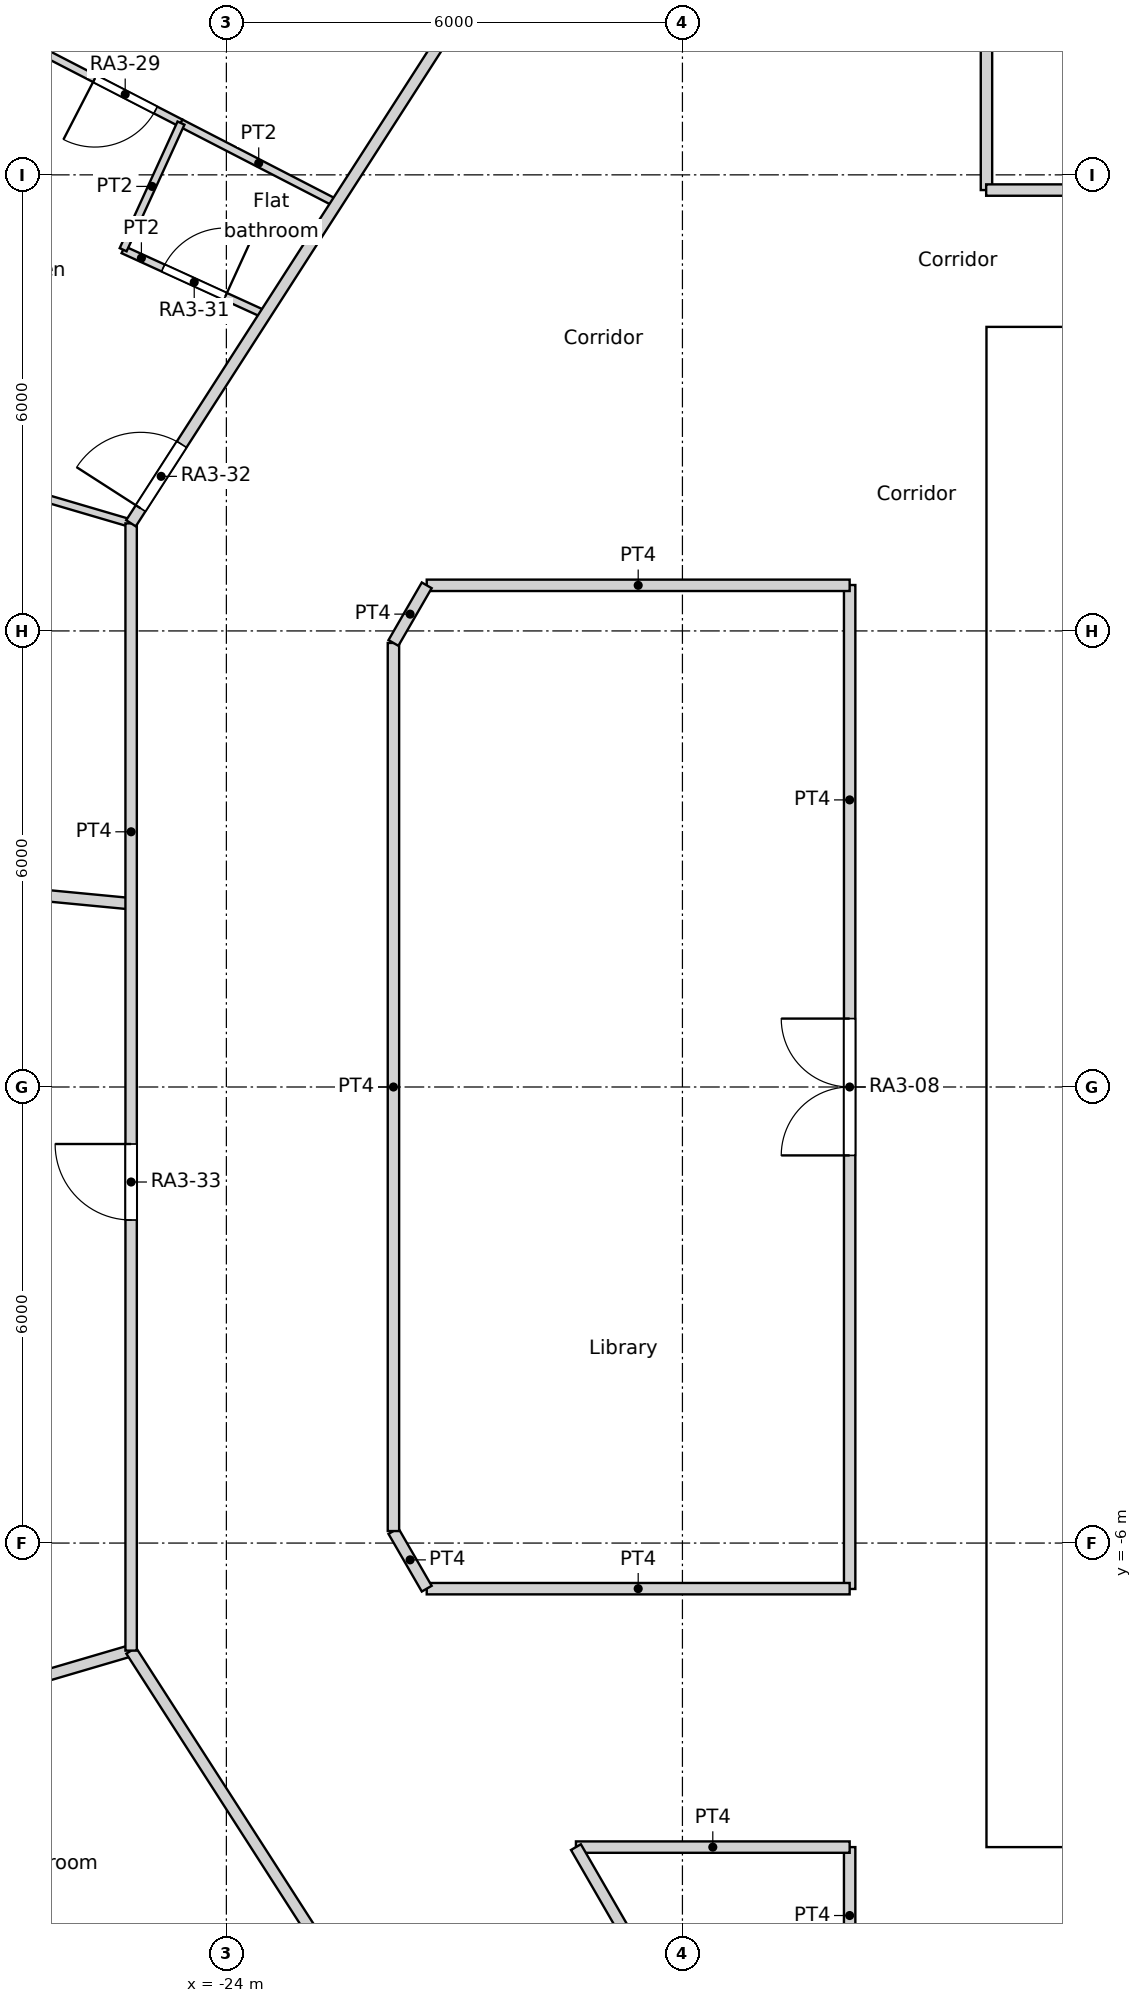
"""IFC4 building model, lengths in metres.
Left out: names, types, materials, properties, quantities, classifications, styles, units other than length and angle.
Written with IfcOpenShell. Run it as: python <this file> out.ifc"""

import sys

from ifc_helpers import new_model, si_unit, direction, frame, frame_2d, origin, origin_2d, place, context, subcontext, project, spatial, rectangle, circle, extrude, element, fill, save


model = new_model("IFC4")
c1 = context("Model", 3, precision=1e-05, world=origin(), true_north=direction((0.0, 1.0)))
c2 = subcontext(c1, "Body", "Model", "MODEL_VIEW")
j1 = project(units=[si_unit("LENGTHUNIT", "METRE"), si_unit("PLANEANGLEUNIT", "RADIAN")], contexts=[c1])
p1 = place(None, origin())
s1 = spatial("IfcSite", under=j1, at=p1, CompositionType="ELEMENT")
p2 = place(p1, origin())
s2 = spatial("IfcBuilding", under=s1, at=p2, CompositionType="ELEMENT")
p3 = place(p2, frame((0.0, 0.0, 49.8)))
s3 = spatial("IfcBuildingStorey", under=s2, at=p3, CompositionType="ELEMENT", Elevation=49.8)
p4 = place(p3, frame((-26.909, 13.873, 0.0), z_axis=(0.0, 0.0, 1.0), x_axis=(1.0, 0.0, 0.0)))
e1 = element("IfcColumn", 1, at=p4, inside=s3, PredefinedType="COLUMN", context=c2, shape_type="SweptSolid", body=[
    extrude(circle(Radius=0.7, at=origin_2d()), origin(), (0.0, 0.0, 1.0), 3.6),
])
for number, where, z_axis, x_axis in (
    (2, (-20.509, 13.489, 0.0), (0.0, 0.0, 1.0), (1.0, 0.0, 0.0)),
    (3, (-23.067, 8.396, 0.0), (0.0, 0.0, 1.0), (1.0, 0.0, 0.0)),
    (4, (-24.382, 2.85, 0.0), (0.0, 0.0, 1.0), (1.0, 0.0, 0.0)),
    (5, (-24.382, -2.85, 0.0), (0.0, 0.0, 1.0), (1.0, 0.0, 0.0)),
    (6, (-23.067, -8.396, 0.0), (0.0, 0.0, 1.0), (1.0, 0.0, 0.0)),
):
    element("IfcColumn", number, at=place(p3, frame(where, z_axis=z_axis, x_axis=x_axis)), inside=s3, PredefinedType="COLUMN", context=c2, shape_type="SweptSolid", body=[
        extrude(circle(Radius=0.75, at=origin_2d()), origin(), (0.0, 0.0, 1.0), 3.6),
    ])
for number, where, z_axis, x_axis in (
    (7, (-13.798, 12.802, 0.0), (0.0, 0.0, 1.0), (1.0, 0.0, 0.0)),
    (8, (-16.958, 8.167, 0.0), (0.0, 0.0, 1.0), (1.0, 0.0, 0.0)),
    (9, (-18.612, 2.805, 0.0), (0.0, 0.0, 1.0), (1.0, 0.0, 0.0)),
    (10, (-18.612, -2.805, 0.0), (0.0, 0.0, 1.0), (1.0, 0.0, 0.0)),
    (11, (-16.958, -8.167, 0.0), (0.0, 0.0, 1.0), (1.0, 0.0, 0.0)),
):
    element("IfcColumn", number, at=place(p3, frame(where, z_axis=z_axis, x_axis=x_axis)), inside=s3, PredefinedType="COLUMN", context=c2, shape_type="SweptSolid", body=[
        extrude(circle(Radius=0.8, at=origin_2d()), origin(), (0.0, 0.0, 1.0), 3.6),
    ])
p5 = place(p3, frame((-14.0, -9.4, 0.0), z_axis=(0.0, 0.0, 1.0), x_axis=(1.0, 0.0, 0.0)))
e12 = element("IfcWall", 12, at=p5, inside=s3, PredefinedType="SOLIDWALL", context=c2, shape_type="SweptSolid", body=[
    extrude(rectangle(XDim=28.0, YDim=1.2, at=frame_2d((14.0, 0.0))), origin(), (0.0, 0.0, 1.0), 3.6),
])
p6 = place(p5, frame((14.9, 0.0, 0.0)))
e13 = element("IfcOpeningElement", 13, at=p6, cuts=e12, PredefinedType="OPENING", context=c2, shape_type="SweptSolid", body=[
    extrude(rectangle(XDim=1.0, YDim=2.1, at=frame_2d((0.5, 1.05))), frame((0.0, 0.6, 0.0), z_axis=(0.0, -1.0, 0.0), x_axis=(1.0, 0.0, 0.0)), (0.0, 0.0, 1.0), 1.2),
])
p7 = place(p5, frame((9.8, 0.0, 0.0)))
e14 = element("IfcOpeningElement", 14, at=p7, cuts=e12, PredefinedType="OPENING", context=c2, shape_type="SweptSolid", body=[
    extrude(rectangle(XDim=1.8, YDim=2.1, at=frame_2d((0.9, 1.05))), frame((0.0, 0.6, 0.0), z_axis=(0.0, -1.0, 0.0), x_axis=(1.0, 0.0, 0.0)), (0.0, 0.0, 1.0), 1.2),
])
p8 = place(p5, frame((16.4, 0.0, 0.0)))
e15 = element("IfcOpeningElement", 15, at=p8, cuts=e12, PredefinedType="OPENING", context=c2, shape_type="SweptSolid", body=[
    extrude(rectangle(XDim=1.8, YDim=2.1, at=frame_2d((0.9, 1.05))), frame((0.0, 0.6, 0.0), z_axis=(0.0, -1.0, 0.0), x_axis=(1.0, 0.0, 0.0)), (0.0, 0.0, 1.0), 1.2),
])
p9 = place(p3, frame((-14.0, 9.4, 0.0), z_axis=(0.0, 0.0, 1.0), x_axis=(1.0, 0.0, 0.0)))
e16 = element("IfcWall", 16, at=p9, inside=s3, PredefinedType="SOLIDWALL", context=c2, shape_type="SweptSolid", body=[
    extrude(rectangle(XDim=28.0, YDim=1.2, at=frame_2d((14.0, 0.0))), origin(), (0.0, 0.0, 1.0), 3.6),
])
p10 = place(p9, frame((9.8, 0.0, 0.0)))
e17 = element("IfcOpeningElement", 17, at=p10, cuts=e16, PredefinedType="OPENING", context=c2, shape_type="SweptSolid", body=[
    extrude(rectangle(XDim=1.8, YDim=2.1, at=frame_2d((0.9, 1.05))), frame((0.0, 0.6, 0.0), z_axis=(0.0, -1.0, 0.0), x_axis=(1.0, 0.0, 0.0)), (0.0, 0.0, 1.0), 1.2),
])
p11 = place(p3, frame((-13.4, -8.8, 0.0), z_axis=(0.0, 0.0, 1.0), x_axis=(0.0, 1.0, 0.0)))
e18 = element("IfcWall", 18, at=p11, inside=s3, PredefinedType="SOLIDWALL", context=c2, shape_type="SweptSolid", body=[
    extrude(rectangle(XDim=17.6, YDim=1.2, at=frame_2d((8.8, 0.0))), origin(), (0.0, 0.0, 1.0), 3.6),
])
p12 = place(p11, frame((5.2, 0.0, 0.0)))
e19 = element("IfcOpeningElement", 19, at=p12, cuts=e18, PredefinedType="OPENING", context=c2, shape_type="SweptSolid", body=[
    extrude(rectangle(XDim=1.0, YDim=2.1, at=frame_2d((0.5, 1.05))), frame((0.0, 0.6, 0.0), z_axis=(0.0, -1.0, 0.0), x_axis=(1.0, 0.0, 0.0)), (0.0, 0.0, 1.0), 1.2),
])
p13 = place(p11, frame((11.4, 0.0, 0.0)))
e20 = element("IfcOpeningElement", 20, at=p13, cuts=e18, PredefinedType="OPENING", context=c2, shape_type="SweptSolid", body=[
    extrude(rectangle(XDim=1.0, YDim=2.1, at=frame_2d((0.5, 1.05))), frame((0.0, 0.6, 0.0), z_axis=(0.0, -1.0, 0.0), x_axis=(1.0, 0.0, 0.0)), (0.0, 0.0, 1.0), 1.2),
])
p14 = place(p3, frame((-14.004, 11.8, 0.0), z_axis=(0.0, 0.0, 1.0), x_axis=(1.0, 0.0, 0.0)))
e21 = element("IfcWall", 21, at=p14, inside=s3, PredefinedType="PARTITIONING", context=c2, shape_type="SweptSolid", body=[
    extrude(rectangle(XDim=12.816, YDim=0.15, at=frame_2d((6.408, 0.0))), origin(), (0.0, 0.0, 1.0), 3.15),
])
p15 = place(p14, frame((5.508, 0.0, 0.0)))
e22 = element("IfcOpeningElement", 22, at=p15, cuts=e21, PredefinedType="OPENING", context=c2, shape_type="SweptSolid", body=[
    extrude(rectangle(XDim=1.8, YDim=2.1, at=frame_2d((0.9, 1.05))), frame((0.0, 0.075, 0.0), z_axis=(0.0, -1.0, 0.0), x_axis=(1.0, 0.0, 0.0)), (0.0, 0.0, 1.0), 0.15),
])
p16 = place(p3, frame((-15.8, -11.8, 0.0), z_axis=(0.0, 0.0, 1.0), x_axis=(0.0, 1.0, 0.0)))
e23 = element("IfcWall", 23, at=p16, inside=s3, PredefinedType="PARTITIONING", context=c2, shape_type="SweptSolid", body=[
    extrude(rectangle(XDim=1.8, YDim=0.15, at=frame_2d((0.9, 0.0))), origin(), (0.0, 0.0, 1.0), 3.15),
])
p17 = place(p3, frame((-15.8, -6.604, 0.0), z_axis=(0.0, 0.0, 1.0), x_axis=(0.0, 1.0, 0.0)))
e24 = element("IfcWall", 24, at=p17, inside=s3, PredefinedType="PARTITIONING", context=c2, shape_type="SweptSolid", body=[
    extrude(rectangle(XDim=13.208, YDim=0.15, at=frame_2d((6.604, 0.0))), origin(), (0.0, 0.0, 1.0), 3.15),
])
p18 = place(p17, frame((5.704, 0.0, 0.0)))
e25 = element("IfcOpeningElement", 25, at=p18, cuts=e24, PredefinedType="OPENING", context=c2, shape_type="SweptSolid", body=[
    extrude(rectangle(XDim=1.8, YDim=2.1, at=frame_2d((0.9, 1.05))), frame((0.0, 0.075, 0.0), z_axis=(0.0, -1.0, 0.0), x_axis=(1.0, 0.0, 0.0)), (0.0, 0.0, 1.0), 0.15),
])
p19 = place(p3, frame((-14.0, 11.8, 0.0), z_axis=(0.0, 0.0, 1.0), x_axis=(0.0, 1.0, 0.0)))
e26 = element("IfcWall", 26, at=p19, inside=s3, PredefinedType="PARTITIONING", context=c2, shape_type="SweptSolid", body=[
    extrude(rectangle(XDim=5.292, YDim=0.15, at=frame_2d((2.646, 0.0))), origin(), (0.0, 0.0, 1.0), 3.15),
])
p20 = place(p3, frame((-25.255, 7.416, 0.0), z_axis=(0.0, 0.0, 1.0), x_axis=(0.540805851332, 0.841147449123, 0.0)))
e27 = element("IfcWall", 27, at=p20, inside=s3, PredefinedType="PARTITIONING", context=c2, shape_type="SweptSolid", body=[
    extrude(rectangle(XDim=14.829, YDim=0.15, at=frame_2d((7.415, 0.0))), origin(), (0.0, 0.0, 1.0), 3.15),
])
p21 = place(p20, frame((0.234, 0.0, 0.0)))
e28 = element("IfcOpeningElement", 28, at=p21, cuts=e27, PredefinedType="OPENING", context=c2, shape_type="SweptSolid", body=[
    extrude(rectangle(XDim=1.0, YDim=2.1, at=frame_2d((0.5, 1.05))), frame((0.0, 0.075, 0.0), z_axis=(0.0, -1.0, 0.0), x_axis=(1.0, 0.0, 0.0)), (0.0, 0.0, 1.0), 0.15),
])
p22 = place(p3, frame((-21.364, 6.6, 0.0), z_axis=(0.0, 0.0, 1.0), x_axis=(1.0, 0.0, 0.0)))
e29 = element("IfcWall", 29, at=p22, inside=s3, PredefinedType="PARTITIONING", context=c2, shape_type="SweptSolid", body=[
    extrude(rectangle(XDim=5.564, YDim=0.15, at=frame_2d((2.782, 0.0))), origin(), (0.0, 0.0, 1.0), 3.15),
])
p23 = place(p3, frame((-21.802, 5.842, 0.0), z_axis=(0.0, 0.0, 1.0), x_axis=(0.500277597875, 0.865865073245, 0.0)))
e30 = element("IfcWall", 30, at=p23, inside=s3, PredefinedType="PARTITIONING", context=c2, shape_type="SweptSolid", body=[
    extrude(rectangle(XDim=0.875, YDim=0.15, at=frame_2d((0.438, 0.0))), origin(), (0.0, 0.0, 1.0), 3.15),
])
p24 = place(p3, frame((-21.802, -5.842, 0.0), z_axis=(0.0, 0.0, 1.0), x_axis=(0.0, 1.0, 0.0)))
e31 = element("IfcWall", 31, at=p24, inside=s3, PredefinedType="PARTITIONING", context=c2, shape_type="SweptSolid", body=[
    extrude(rectangle(XDim=11.684, YDim=0.15, at=frame_2d((5.842, 0.0))), origin(), (0.0, 0.0, 1.0), 3.15),
])
p25 = place(p3, frame((-21.802, -5.842, 0.0), z_axis=(0.0, 0.0, 1.0), x_axis=(0.500277597875, -0.865865073245, 0.0)))
e32 = element("IfcWall", 32, at=p25, inside=s3, PredefinedType="PARTITIONING", context=c2, shape_type="SweptSolid", body=[
    extrude(rectangle(XDim=0.875, YDim=0.15, at=frame_2d((0.438, 0.0))), origin(), (0.0, 0.0, 1.0), 3.15),
])
p26 = place(p3, frame((-21.364, -6.6, 0.0), z_axis=(0.0, 0.0, 1.0), x_axis=(1.0, 0.0, 0.0)))
e33 = element("IfcWall", 33, at=p26, inside=s3, PredefinedType="PARTITIONING", context=c2, shape_type="SweptSolid", body=[
    extrude(rectangle(XDim=5.564, YDim=0.15, at=frame_2d((2.782, 0.0))), origin(), (0.0, 0.0, 1.0), 3.15),
])
p27 = place(p3, frame((-19.401, -10.0, 0.0), z_axis=(0.0, 0.0, 1.0), x_axis=(1.0, 0.0, 0.0)))
e34 = element("IfcWall", 34, at=p27, inside=s3, PredefinedType="PARTITIONING", context=c2, shape_type="SweptSolid", body=[
    extrude(rectangle(XDim=3.601, YDim=0.15, at=frame_2d((1.8, 0.0))), origin(), (0.0, 0.0, 1.0), 3.15),
])
p28 = place(p3, frame((-19.401, -10.0, 0.0), z_axis=(0.0, 0.0, 1.0), x_axis=(0.499992689227, -0.86602962462, 0.0)))
e35 = element("IfcWall", 35, at=p28, inside=s3, PredefinedType="PARTITIONING", context=c2, shape_type="SweptSolid", body=[
    extrude(rectangle(XDim=6.882, YDim=0.15, at=frame_2d((3.441, 0.0))), origin(), (0.0, 0.0, 1.0), 3.15),
])
p29 = place(p28, frame((2.941, 0.0, 0.0)))
e36 = element("IfcOpeningElement", 36, at=p29, cuts=e35, PredefinedType="OPENING", context=c2, shape_type="SweptSolid", body=[
    extrude(rectangle(XDim=1.0, YDim=2.04, at=frame_2d((0.5, 1.02))), frame((0.0, 0.075, 0.0), z_axis=(0.0, -1.0, 0.0), x_axis=(1.0, 0.0, 0.0)), (0.0, 0.0, 1.0), 0.15),
])
p30 = place(p3, frame((-25.253, -7.415, 0.0), z_axis=(0.0, 0.0, 1.0), x_axis=(0.0, 1.0, 0.0)))
e37 = element("IfcWall", 37, at=p30, inside=s3, PredefinedType="PARTITIONING", context=c2, shape_type="SweptSolid", body=[
    extrude(rectangle(XDim=14.83, YDim=0.15, at=frame_2d((7.415, 0.0))), origin(), (0.0, 0.0, 1.0), 3.15),
])
p31 = place(p30, frame((5.665, 0.0, 0.0)))
e38 = element("IfcOpeningElement", 38, at=p31, cuts=e37, PredefinedType="OPENING", context=c2, shape_type="SweptSolid", body=[
    extrude(rectangle(XDim=1.0, YDim=2.04, at=frame_2d((0.5, 1.02))), frame((0.0, 0.075, 0.0), z_axis=(0.0, -1.0, 0.0), x_axis=(1.0, 0.0, 0.0)), (0.0, 0.0, 1.0), 0.15),
])
p32 = place(p3, frame((-25.253, -7.415, 0.0), z_axis=(0.0, 0.0, 1.0), x_axis=(0.540667724156, -0.841236240337, 0.0)))
e39 = element("IfcWall", 39, at=p32, inside=s3, PredefinedType="PARTITIONING", context=c2, shape_type="SweptSolid", body=[
    extrude(rectangle(XDim=14.83, YDim=0.15, at=frame_2d((7.415, 0.0))), origin(), (0.0, 0.0, 1.0), 3.15),
])
p33 = place(p32, frame((5.452, 0.0, 0.0)))
e40 = element("IfcOpeningElement", 40, at=p33, cuts=e39, PredefinedType="OPENING", context=c2, shape_type="SweptSolid", body=[
    extrude(rectangle(XDim=1.0, YDim=2.1, at=frame_2d((0.5, 1.05))), frame((0.0, 0.075, 0.0), z_axis=(0.0, -1.0, 0.0), x_axis=(1.0, 0.0, 0.0)), (0.0, 0.0, 1.0), 0.15),
])
p34 = place(p3, frame((-27.753, 14.308, 0.0), z_axis=(0.0, 0.0, 1.0), x_axis=(0.888816732692, -0.45826282381, 0.0)))
e41 = element("IfcWall", 41, at=p34, inside=s3, PredefinedType="PARTITIONING", context=c2, shape_type="SweptSolid", body=[
    extrude(rectangle(XDim=3.551, YDim=0.1, at=frame_2d((1.775, 0.0))), origin(), (0.0, 0.0, 1.0), 3.15),
])
p35 = place(p34, frame((2.275, 0.0, 0.0)))
e42 = element("IfcOpeningElement", 42, at=p35, cuts=e41, PredefinedType="OPENING", context=c2, shape_type="SweptSolid", body=[
    extrude(rectangle(XDim=0.9, YDim=2.1, at=frame_2d((0.45, 1.05))), frame((0.0, 0.05, 0.0), z_axis=(0.0, -1.0, 0.0), x_axis=(1.0, 0.0, 0.0)), (0.0, 0.0, 1.0), 0.1),
])
p36 = place(p3, frame((-29.959, 8.797, 0.0), z_axis=(0.0, 0.0, 1.0), x_axis=(0.959478767209, -0.281780934902, 0.0)))
e43 = element("IfcWall", 43, at=p36, inside=s3, PredefinedType="PARTITIONING", context=c2, shape_type="SweptSolid", body=[
    extrude(rectangle(XDim=4.905, YDim=0.1, at=frame_2d((2.452, 0.0))), origin(), (0.0, 0.0, 1.0), 3.15),
])
p37 = place(p36, frame((2.303, 0.0, 0.0)))
e44 = element("IfcOpeningElement", 44, at=p37, cuts=e43, PredefinedType="OPENING", context=c2, shape_type="SweptSolid", body=[
    extrude(rectangle(XDim=0.9, YDim=2.1, at=frame_2d((0.45, 1.05))), frame((0.0, 0.05, 0.0), z_axis=(0.0, -1.0, 0.0), x_axis=(1.0, 0.0, 0.0)), (0.0, 0.0, 1.0), 0.1),
])
p38 = place(p3, frame((-25.358, 11.015, 0.0), z_axis=(0.0, 0.0, 1.0), x_axis=(0.415479380762, 0.909602596831, 0.0)))
e45 = element("IfcWall", 45, at=p38, inside=s3, PredefinedType="PARTITIONING", context=c2, shape_type="SweptSolid", body=[
    extrude(rectangle(XDim=1.832, YDim=0.1, at=frame_2d((0.916, 0.0))), origin(), (0.0, 0.0, 1.0), 3.15),
])
p39 = place(p3, frame((-25.358, 11.015, 0.0), z_axis=(0.0, 0.0, 1.0), x_axis=(0.909620690235, -0.415439766868, 0.0)))
e46 = element("IfcWall", 46, at=p39, inside=s3, PredefinedType="PARTITIONING", context=c2, shape_type="SweptSolid", body=[
    extrude(rectangle(XDim=2.056, YDim=0.1, at=frame_2d((1.028, 0.0))), origin(), (0.0, 0.0, 1.0), 3.15),
])
p40 = place(p39, frame((0.578, 0.0, 0.0)))
e47 = element("IfcOpeningElement", 47, at=p40, cuts=e46, PredefinedType="OPENING", context=c2, shape_type="SweptSolid", body=[
    extrude(rectangle(XDim=0.9, YDim=2.0, at=frame_2d((0.45, 1.0))), frame((0.0, 0.05, 0.0), z_axis=(0.0, -1.0, 0.0), x_axis=(1.0, 0.0, 0.0)), (0.0, 0.0, 1.0), 0.1),
])
p41 = place(p3, frame((-24.601, 12.683, 0.0), z_axis=(0.0, 0.0, 1.0), x_axis=(0.888712343697, -0.458465233317, 0.0)))
e48 = element("IfcWall", 48, at=p41, inside=s3, PredefinedType="PARTITIONING", context=c2, shape_type="SweptSolid", body=[
    extrude(rectangle(XDim=2.31, YDim=0.1, at=frame_2d((1.155, 0.0))), origin(), (0.0, 0.0, 1.0), 3.15),
])
p42 = place(p3, frame((-31.083, 2.968, 0.0), z_axis=(0.0, 0.0, 1.0), x_axis=(0.995465070325, -0.095127775983, 0.0)))
e49 = element("IfcWall", 49, at=p42, inside=s3, PredefinedType="PARTITIONING", context=c2, shape_type="SweptSolid", body=[
    extrude(rectangle(XDim=5.857, YDim=0.15, at=frame_2d((2.928, 0.0))), origin(), (0.0, 0.0, 1.0), 3.15),
])
p43 = place(p3, frame((-29.959, -8.797, 0.0), z_axis=(0.0, 0.0, 1.0), x_axis=(0.959478767209, 0.281780934902, 0.0)))
e50 = element("IfcWall", 50, at=p43, inside=s3, PredefinedType="PARTITIONING", context=c2, shape_type="SweptSolid", body=[
    extrude(rectangle(XDim=4.905, YDim=0.15, at=frame_2d((2.452, 0.0))), origin(), (0.0, 0.0, 1.0), 3.15),
])
p44 = place(p12, origin())
e51 = element("IfcDoor", 51, at=p44, inside=s3, OperationType="DOUBLE_DOOR_SINGLE_SWING", PredefinedType="DOOR", context=c2, shape_type="SweptSolid", body=[
    extrude(rectangle(XDim=1.0, YDim=2.1, at=frame_2d((0.5, 1.05))), frame((0.0, 0.025, 0.0), z_axis=(0.0, -1.0, 0.0), x_axis=(1.0, 0.0, 0.0)), (0.0, 0.0, 1.0), 0.05),
])
fill(e19, e51)
p45 = place(p13, origin())
e52 = element("IfcDoor", 52, at=p45, inside=s3, OperationType="DOUBLE_DOOR_SINGLE_SWING", PredefinedType="DOOR", context=c2, shape_type="SweptSolid", body=[
    extrude(rectangle(XDim=1.0, YDim=2.1, at=frame_2d((0.5, 1.05))), frame((0.0, 0.025, 0.0), z_axis=(0.0, -1.0, 0.0), x_axis=(1.0, 0.0, 0.0)), (0.0, 0.0, 1.0), 0.05),
])
fill(e20, e52)
p46 = place(p18, origin())
e53 = element("IfcDoor", 53, at=p46, inside=s3, OperationType="DOUBLE_DOOR_SINGLE_SWING", PredefinedType="DOOR", context=c2, shape_type="SweptSolid", body=[
    extrude(rectangle(XDim=1.8, YDim=2.1, at=frame_2d((0.9, 1.05))), frame((0.0, 0.025, 0.0), z_axis=(0.0, -1.0, 0.0), x_axis=(1.0, 0.0, 0.0)), (0.0, 0.0, 1.0), 0.05),
])
fill(e25, e53)
p47 = place(p35, origin())
e54 = element("IfcDoor", 54, at=p47, inside=s3, OperationType="SINGLE_SWING_RIGHT", PredefinedType="DOOR", context=c2, shape_type="SweptSolid", body=[
    extrude(rectangle(XDim=0.9, YDim=2.1, at=frame_2d((0.45, 1.05))), frame((0.0, 0.025, 0.0), z_axis=(0.0, -1.0, 0.0), x_axis=(1.0, 0.0, 0.0)), (0.0, 0.0, 1.0), 0.05),
])
fill(e42, e54)
p48 = place(p40, origin())
e55 = element("IfcDoor", 55, at=p48, inside=s3, OperationType="SINGLE_SWING_RIGHT", PredefinedType="DOOR", context=c2, shape_type="SweptSolid", body=[
    extrude(rectangle(XDim=0.9, YDim=2.0, at=frame_2d((0.45, 1.0))), frame((0.0, 0.025, 0.0), z_axis=(0.0, -1.0, 0.0), x_axis=(1.0, 0.0, 0.0)), (0.0, 0.0, 1.0), 0.05),
])
fill(e47, e55)
p49 = place(p21, origin())
e56 = element("IfcDoor", 56, at=p49, inside=s3, OperationType="SINGLE_SWING_LEFT", PredefinedType="DOOR", context=c2, shape_type="SweptSolid", body=[
    extrude(rectangle(XDim=1.0, YDim=2.1, at=frame_2d((0.5, 1.05))), frame((0.0, 0.025, 0.0), z_axis=(0.0, -1.0, 0.0), x_axis=(1.0, 0.0, 0.0)), (0.0, 0.0, 1.0), 0.05),
])
fill(e28, e56)
p50 = place(p31, origin())
e57 = element("IfcDoor", 57, at=p50, inside=s3, OperationType="SINGLE_SWING_RIGHT", PredefinedType="DOOR", context=c2, shape_type="SweptSolid", body=[
    extrude(rectangle(XDim=1.0, YDim=2.04, at=frame_2d((0.5, 1.02))), frame((0.0, 0.025, 0.0), z_axis=(0.0, -1.0, 0.0), x_axis=(1.0, 0.0, 0.0)), (0.0, 0.0, 1.0), 0.05),
])
fill(e38, e57)
save(model, sys.argv[1])
